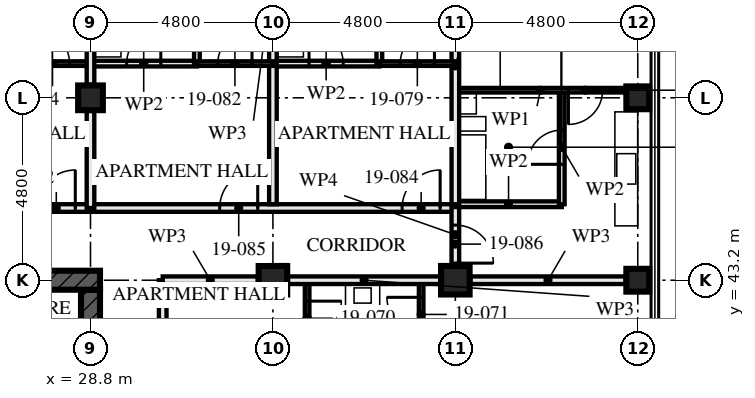
"""IFC4 building model, lengths in metres.
Left out: names, types, materials, properties, quantities, classifications, styles, units other than length and angle.
Written with IfcOpenShell. Run it as: python <this file> out.ifc"""

import sys

from ifc_helpers import new_model, si_unit, direction, frame, frame_2d, origin, origin_2d, place, context, subcontext, project, spatial, rectangle, hollow_rectangle, extrude, element, fill, save


model = new_model("IFC4")
c1 = context("Model", 3, precision=1e-05, world=origin(), true_north=direction((0.0, 1.0)))
c2 = subcontext(c1, "Body", "Model", "MODEL_VIEW")
j1 = project(units=[si_unit("LENGTHUNIT", "METRE"), si_unit("PLANEANGLEUNIT", "RADIAN")], contexts=[c1])
p1 = place(None, origin())
s1 = spatial("IfcSite", under=j1, at=p1, CompositionType="ELEMENT")
p2 = place(p1, origin())
s2 = spatial("IfcBuilding", under=s1, at=p2, CompositionType="ELEMENT")
p3 = place(p2, frame((0.0, 0.0, 72.5)))
s3 = spatial("IfcBuildingStorey", under=s2, at=p3, CompositionType="ELEMENT", Elevation=72.5)
p4 = place(p3, frame((28.8, 48.0, 0.0), z_axis=(0.0, 0.0, 1.0), x_axis=(1.0, 0.0, 0.0)))
e1 = element("IfcColumn", 1, at=p4, inside=s3, PredefinedType="COLUMN", context=c2, shape_type="SweptSolid", body=[
    extrude(hollow_rectangle(XDim=0.65, YDim=0.65, WallThickness=0.05, at=origin_2d()), origin(), (0.0, 0.0, 1.0), 3.5),
])
for number, where, z_axis, x_axis in (
    (2, (33.6, 43.2, 0.0), (0.0, 0.0, 1.0), (0.0, 1.0, 0.0)),
    (3, (38.4, 43.2, 0.0), (0.0, 0.0, 1.0), (0.0, 1.0, 0.0)),
):
    element("IfcColumn", number, at=place(p3, frame(where, z_axis=z_axis, x_axis=x_axis)), inside=s3, PredefinedType="COLUMN", context=c2, shape_type="SweptSolid", body=[
        extrude(hollow_rectangle(XDim=0.75, YDim=0.75, WallThickness=0.08, at=origin_2d()), origin(), (0.0, 0.0, 1.0), 3.5),
    ])
for number, where, z_axis, x_axis in (
    (4, (43.2, 43.2, 0.0), (0.0, 0.0, 1.0), (0.0, 1.0, 0.0)),
    (5, (43.2, 48.0, 0.0), (0.0, 0.0, 1.0), (1.0, 0.0, 0.0)),
):
    element("IfcColumn", number, at=place(p3, frame(where, z_axis=z_axis, x_axis=x_axis)), inside=s3, PredefinedType="COLUMN", context=c2, shape_type="SweptSolid", body=[
        extrude(hollow_rectangle(XDim=0.6, YDim=0.6, WallThickness=0.08, at=origin_2d()), origin(), (0.0, 0.0, 1.0), 3.5),
    ])
p5 = place(p3, frame((29.05, 43.2, -0.17), z_axis=(0.0, 0.0, 1.0), x_axis=(-1.0, 0.0, 0.0)))
e6 = element("IfcWall", 6, at=p5, inside=s3, PredefinedType="SHEAR", context=c2, shape_type="SweptSolid", body=[
    extrude(rectangle(XDim=14.9, YDim=0.5, at=frame_2d((7.45, 0.0))), origin(), (0.0, 0.0, 1.0), 3.5),
])
p6 = place(p5, frame((6.85, 0.0, 0.17)))
e7 = element("IfcOpeningElement", 7, at=p6, cuts=e6, PredefinedType="OPENING", context=c2, shape_type="SweptSolid", body=[
    extrude(rectangle(XDim=1.2, YDim=2.1, at=frame_2d((0.6, 1.05))), frame((0.0, 0.26, 0.0), z_axis=(0.0, -1.0, 0.0), x_axis=(1.0, 0.0, 0.0)), (0.0, 0.0, 1.0), 0.521),
])
p7 = place(p3, frame((28.8, 29.05, -0.17), z_axis=(0.0, 0.0, 1.0), x_axis=(0.0, 1.0, 0.0)))
e8 = element("IfcWall", 8, at=p7, inside=s3, PredefinedType="SHEAR", context=c2, shape_type="SweptSolid", body=[
    extrude(rectangle(XDim=13.9, YDim=0.5, at=frame_2d((6.95, 0.0))), origin(), (0.0, 0.0, 1.0), 3.5),
])
p8 = place(p7, frame((6.35, 0.0, 0.17)))
e9 = element("IfcOpeningElement", 9, at=p8, cuts=e8, PredefinedType="OPENING", context=c2, shape_type="SweptSolid", body=[
    extrude(rectangle(XDim=1.2, YDim=2.1, at=frame_2d((0.6, 1.05))), frame((0.0, 0.26, 0.0), z_axis=(0.0, -1.0, 0.0), x_axis=(1.0, 0.0, 0.0)), (0.0, 0.0, 1.0), 0.521),
])
p9 = place(p3, frame((28.8, 48.9, 0.0), z_axis=(0.0, 0.0, 1.0), x_axis=(-1.0, 0.0, 0.0)))
e10 = element("IfcWall", 10, at=p9, inside=s3, PredefinedType="PARTITIONING", context=c2, shape_type="SweptSolid", body=[
    extrude(rectangle(XDim=2.0, YDim=0.12, at=frame_2d((1.0, 0.0))), origin(), (0.0, 0.0, 1.0), 3.33),
])
p10 = place(p9, frame((0.55, 0.0, 0.0)))
e11 = element("IfcOpeningElement", 11, at=p10, cuts=e10, PredefinedType="OPENING", context=c2, shape_type="SweptSolid", body=[
    extrude(rectangle(XDim=0.9, YDim=2.1, at=frame_2d((0.45, 1.05))), frame((0.0, 0.071, 0.0), z_axis=(0.0, -1.0, 0.0), x_axis=(1.0, 0.0, 0.0)), (0.0, 0.0, 1.0), 0.141),
])
p11 = place(p3, frame((28.8, 45.1, 0.0), z_axis=(0.0, 0.0, 1.0), x_axis=(-1.0, 0.0, 0.0)))
e12 = element("IfcWall", 12, at=p11, inside=s3, PredefinedType="PARTITIONING", context=c2, shape_type="SweptSolid", body=[
    extrude(rectangle(XDim=14.4, YDim=0.2, at=frame_2d((7.2, 0.0))), origin(), (0.0, 0.0, 1.0), 3.33),
])
p12 = place(p11, frame((0.4, 0.0, 0.0)))
e13 = element("IfcOpeningElement", 13, at=p12, cuts=e12, PredefinedType="OPENING", context=c2, shape_type="SweptSolid", body=[
    extrude(rectangle(XDim=1.0, YDim=2.1, at=frame_2d((0.5, 1.05))), frame((0.0, 0.111, 0.0), z_axis=(0.0, -1.0, 0.0), x_axis=(1.0, 0.0, 0.0)), (0.0, 0.0, 1.0), 0.221),
])
p13 = place(p11, frame((5.2, 0.0, 0.0)))
e14 = element("IfcOpeningElement", 14, at=p13, cuts=e12, PredefinedType="OPENING", context=c2, shape_type="SweptSolid", body=[
    extrude(rectangle(XDim=1.0, YDim=2.1, at=frame_2d((0.5, 1.05))), frame((0.0, 0.111, 0.0), z_axis=(0.0, -1.0, 0.0), x_axis=(1.0, 0.0, 0.0)), (0.0, 0.0, 1.0), 0.221),
])
p14 = place(p11, frame((10.0, 0.0, 0.0)))
e15 = element("IfcOpeningElement", 15, at=p14, cuts=e12, PredefinedType="OPENING", context=c2, shape_type="SweptSolid", body=[
    extrude(rectangle(XDim=1.0, YDim=2.1, at=frame_2d((0.5, 1.05))), frame((0.0, 0.111, 0.0), z_axis=(0.0, -1.0, 0.0), x_axis=(1.0, 0.0, 0.0)), (0.0, 0.0, 1.0), 0.221),
])
p15 = place(p3, frame((34.5, 41.2, 0.0), z_axis=(0.0, 0.0, 1.0), x_axis=(0.0, 1.0, 0.0)))
e16 = element("IfcWall", 16, at=p15, inside=s3, PredefinedType="PARTITIONING", context=c2, shape_type="SweptSolid", body=[
    extrude(rectangle(XDim=2.0, YDim=0.12, at=frame_2d((1.0, 0.0))), origin(), (0.0, 0.0, 1.0), 3.33),
])
p16 = place(p15, frame((0.55, 0.0, 0.0)))
e17 = element("IfcOpeningElement", 17, at=p16, cuts=e16, PredefinedType="OPENING", context=c2, shape_type="SweptSolid", body=[
    extrude(rectangle(XDim=0.9, YDim=2.1, at=frame_2d((0.45, 1.05))), frame((0.0, 0.071, 0.0), z_axis=(0.0, -1.0, 0.0), x_axis=(1.0, 0.0, 0.0)), (0.0, 0.0, 1.0), 0.141),
])
p17 = place(p3, frame((37.5, 38.4, 0.0), z_axis=(0.0, 0.0, 1.0), x_axis=(0.0, 1.0, 0.0)))
e18 = element("IfcWall", 18, at=p17, inside=s3, PredefinedType="PARTITIONING", context=c2, shape_type="SweptSolid", body=[
    extrude(rectangle(XDim=4.8, YDim=0.12, at=frame_2d((2.4, 0.0))), origin(), (0.0, 0.0, 1.0), 3.33),
])
p18 = place(p17, frame((3.45, 0.0, 0.0)))
e19 = element("IfcOpeningElement", 19, at=p18, cuts=e18, PredefinedType="OPENING", context=c2, shape_type="SweptSolid", body=[
    extrude(rectangle(XDim=0.9, YDim=2.1, at=frame_2d((0.45, 1.05))), frame((0.0, 0.071, 0.0), z_axis=(0.0, -1.0, 0.0), x_axis=(1.0, 0.0, 0.0)), (0.0, 0.0, 1.0), 0.141),
])
p19 = place(p3, frame((30.7, 28.8, 0.0), z_axis=(0.0, 0.0, 1.0), x_axis=(0.0, 1.0, 0.0)))
e20 = element("IfcWall", 20, at=p19, inside=s3, PredefinedType="PARTITIONING", context=c2, shape_type="SweptSolid", body=[
    extrude(rectangle(XDim=14.4, YDim=0.2, at=frame_2d((7.2, 0.0))), origin(), (0.0, 0.0, 1.0), 2.55),
])
p20 = place(p19, frame((1.4, 0.0, 0.0)))
e21 = element("IfcOpeningElement", 21, at=p20, cuts=e20, PredefinedType="OPENING", context=c2, shape_type="SweptSolid", body=[
    extrude(rectangle(XDim=1.0, YDim=2.1, at=frame_2d((0.5, 1.05))), frame((0.0, 0.111, 0.0), z_axis=(0.0, -1.0, 0.0), x_axis=(1.0, 0.0, 0.0)), (0.0, 0.0, 1.0), 0.221),
])
p21 = place(p19, frame((4.1, 0.0, 0.0)))
e22 = element("IfcOpeningElement", 22, at=p21, cuts=e20, PredefinedType="OPENING", context=c2, shape_type="SweptSolid", body=[
    extrude(rectangle(XDim=1.0, YDim=2.1, at=frame_2d((0.5, 1.05))), frame((0.0, 0.111, 0.0), z_axis=(0.0, -1.0, 0.0), x_axis=(1.0, 0.0, 0.0)), (0.0, 0.0, 1.0), 0.221),
])
p22 = place(p19, frame((5.975, 0.0, 0.0)))
e23 = element("IfcOpeningElement", 23, at=p22, cuts=e20, PredefinedType="OPENING", context=c2, shape_type="SweptSolid", body=[
    extrude(rectangle(XDim=1.0, YDim=2.1, at=frame_2d((0.5, 1.05))), frame((0.0, 0.111, 0.0), z_axis=(0.0, -1.0, 0.0), x_axis=(1.0, 0.0, 0.0)), (0.0, 0.0, 1.0), 0.221),
])
p23 = place(p19, frame((10.0, 0.0, 0.0)))
e24 = element("IfcOpeningElement", 24, at=p23, cuts=e20, PredefinedType="OPENING", context=c2, shape_type="SweptSolid", body=[
    extrude(rectangle(XDim=1.0, YDim=2.1, at=frame_2d((0.5, 1.05))), frame((0.0, 0.111, 0.0), z_axis=(0.0, -1.0, 0.0), x_axis=(1.0, 0.0, 0.0)), (0.0, 0.0, 1.0), 0.221),
])
p24 = place(p3, frame((41.2, 48.2, 0.0), z_axis=(0.0, 0.0, 1.0), x_axis=(0.0, -1.0, 0.0)))
e25 = element("IfcWall", 25, at=p24, inside=s3, PredefinedType="PARTITIONING", context=c2, shape_type="SweptSolid", body=[
    extrude(rectangle(XDim=3.0, YDim=0.15, at=frame_2d((1.5, 0.0))), origin(), (0.0, 0.0, 1.0), 2.55),
])
p25 = place(p24, frame((1.05, 0.0, 0.0)))
e26 = element("IfcOpeningElement", 26, at=p25, cuts=e25, PredefinedType="OPENING", context=c2, shape_type="SweptSolid", body=[
    extrude(rectangle(XDim=0.9, YDim=2.1, at=frame_2d((0.45, 1.05))), frame((0.0, 0.085, 0.0), z_axis=(0.0, -1.0, 0.0), x_axis=(1.0, 0.0, 0.0)), (0.0, 0.0, 1.0), 0.171),
])
p26 = place(p3, frame((41.2, 45.2, 0.0), z_axis=(0.0, 0.0, 1.0), x_axis=(-1.0, 0.0, 0.0)))
e27 = element("IfcWall", 27, at=p26, inside=s3, PredefinedType="PARTITIONING", context=c2, shape_type="SweptSolid", body=[
    extrude(rectangle(XDim=2.8, YDim=0.15, at=frame_2d((1.4, 0.0))), origin(), (0.0, 0.0, 1.0), 3.33),
])
p27 = place(p3, frame((42.88, 48.2, 0.0), z_axis=(0.0, 0.0, 1.0), x_axis=(-1.0, 0.0, 0.0)))
e28 = element("IfcWall", 28, at=p27, inside=s3, PredefinedType="PARTITIONING", context=c2, shape_type="SweptSolid", body=[
    extrude(rectangle(XDim=4.48, YDim=0.12, at=frame_2d((2.24, 0.0))), origin(), (0.0, 0.0, 1.0), 3.33),
])
p28 = place(p27, frame((0.605, 0.0, 0.0)))
e29 = element("IfcOpeningElement", 29, at=p28, cuts=e28, PredefinedType="OPENING", context=c2, shape_type="SweptSolid", body=[
    extrude(rectangle(XDim=0.9, YDim=2.1, at=frame_2d((0.45, 1.05))), frame((0.0, 0.071, 0.0), z_axis=(0.0, -1.0, 0.0), x_axis=(1.0, 0.0, 0.0)), (0.0, 0.0, 1.0), 0.141),
])
p29 = place(p3, frame((38.4, 52.48, 0.0), z_axis=(0.0, 0.0, 1.0), x_axis=(0.0, -1.0, 0.0)))
e30 = element("IfcWall", 30, at=p29, inside=s3, PredefinedType="PARTITIONING", context=c2, shape_type="SweptSolid", body=[
    extrude(rectangle(XDim=7.28, YDim=0.2, at=frame_2d((3.64, 0.0))), origin(), (0.0, 0.0, 1.0), 2.55),
])
p30 = place(p3, frame((36.4, 51.9, 0.0), z_axis=(0.0, 0.0, 1.0), x_axis=(0.0, -1.0, 0.0)))
e31 = element("IfcWall", 31, at=p30, inside=s3, PredefinedType="PARTITIONING", context=c2, shape_type="SweptSolid", body=[
    extrude(rectangle(XDim=3.0, YDim=0.15, at=frame_2d((1.5, 0.0))), origin(), (0.0, 0.0, 1.0), 3.33),
])
p31 = place(p3, frame((36.4, 48.9, 0.0), z_axis=(0.0, 0.0, 1.0), x_axis=(-1.0, 0.0, 0.0)))
e32 = element("IfcWall", 32, at=p31, inside=s3, PredefinedType="PARTITIONING", context=c2, shape_type="SweptSolid", body=[
    extrude(rectangle(XDim=2.8, YDim=0.15, at=frame_2d((1.4, 0.0))), origin(), (0.0, 0.0, 1.0), 3.33),
])
p32 = place(p31, frame((0.95, 0.0, 0.0)))
e33 = element("IfcOpeningElement", 33, at=p32, cuts=e32, PredefinedType="OPENING", context=c2, shape_type="SweptSolid", body=[
    extrude(rectangle(XDim=0.9, YDim=2.1, at=frame_2d((0.45, 1.05))), frame((0.0, 0.085, 0.0), z_axis=(0.0, -1.0, 0.0), x_axis=(1.0, 0.0, 0.0)), (0.0, 0.0, 1.0), 0.171),
])
p33 = place(p3, frame((38.4, 48.9, 0.0), z_axis=(0.0, 0.0, 1.0), x_axis=(-1.0, 0.0, 0.0)))
e34 = element("IfcWall", 34, at=p33, inside=s3, PredefinedType="PARTITIONING", context=c2, shape_type="SweptSolid", body=[
    extrude(rectangle(XDim=2.0, YDim=0.12, at=frame_2d((1.0, 0.0))), origin(), (0.0, 0.0, 1.0), 3.33),
])
p34 = place(p33, frame((0.55, 0.0, 0.0)))
e35 = element("IfcOpeningElement", 35, at=p34, cuts=e34, PredefinedType="OPENING", context=c2, shape_type="SweptSolid", body=[
    extrude(rectangle(XDim=0.9, YDim=2.1, at=frame_2d((0.45, 1.05))), frame((0.0, 0.071, 0.0), z_axis=(0.0, -1.0, 0.0), x_axis=(1.0, 0.0, 0.0)), (0.0, 0.0, 1.0), 0.141),
])
p35 = place(p3, frame((33.6, 57.28, 0.0), z_axis=(0.0, 0.0, 1.0), x_axis=(0.0, -1.0, 0.0)))
e36 = element("IfcWall", 36, at=p35, inside=s3, PredefinedType="PARTITIONING", context=c2, shape_type="SweptSolid", body=[
    extrude(rectangle(XDim=12.08, YDim=0.2, at=frame_2d((6.04, 0.0))), origin(), (0.0, 0.0, 1.0), 2.55),
])
p36 = place(p3, frame((31.6, 51.9, 0.0), z_axis=(0.0, 0.0, 1.0), x_axis=(0.0, -1.0, 0.0)))
e37 = element("IfcWall", 37, at=p36, inside=s3, PredefinedType="PARTITIONING", context=c2, shape_type="SweptSolid", body=[
    extrude(rectangle(XDim=3.0, YDim=0.15, at=frame_2d((1.5, 0.0))), origin(), (0.0, 0.0, 1.0), 3.33),
])
p37 = place(p3, frame((31.6, 48.9, 0.0), z_axis=(0.0, 0.0, 1.0), x_axis=(-1.0, 0.0, 0.0)))
e38 = element("IfcWall", 38, at=p37, inside=s3, PredefinedType="PARTITIONING", context=c2, shape_type="SweptSolid", body=[
    extrude(rectangle(XDim=2.8, YDim=0.15, at=frame_2d((1.4, 0.0))), origin(), (0.0, 0.0, 1.0), 3.33),
])
p38 = place(p37, frame((0.95, 0.0, 0.0)))
e39 = element("IfcOpeningElement", 39, at=p38, cuts=e38, PredefinedType="OPENING", context=c2, shape_type="SweptSolid", body=[
    extrude(rectangle(XDim=0.9, YDim=2.1, at=frame_2d((0.45, 1.05))), frame((0.0, 0.085, 0.0), z_axis=(0.0, -1.0, 0.0), x_axis=(1.0, 0.0, 0.0)), (0.0, 0.0, 1.0), 0.171),
])
p39 = place(p3, frame((33.6, 48.9, 0.0), z_axis=(0.0, 0.0, 1.0), x_axis=(-1.0, 0.0, 0.0)))
e40 = element("IfcWall", 40, at=p39, inside=s3, PredefinedType="PARTITIONING", context=c2, shape_type="SweptSolid", body=[
    extrude(rectangle(XDim=2.0, YDim=0.12, at=frame_2d((1.0, 0.0))), origin(), (0.0, 0.0, 1.0), 3.33),
])
p40 = place(p39, frame((0.55, 0.0, 0.0)))
e41 = element("IfcOpeningElement", 41, at=p40, cuts=e40, PredefinedType="OPENING", context=c2, shape_type="SweptSolid", body=[
    extrude(rectangle(XDim=0.9, YDim=2.1, at=frame_2d((0.45, 1.05))), frame((0.0, 0.071, 0.0), z_axis=(0.0, -1.0, 0.0), x_axis=(1.0, 0.0, 0.0)), (0.0, 0.0, 1.0), 0.141),
])
p41 = place(p3, frame((38.4, 45.1, 0.0), z_axis=(0.0, 0.0, 1.0), x_axis=(-1.0, 0.0, 0.0)))
e42 = element("IfcWall", 42, at=p41, inside=s3, PredefinedType="PARTITIONING", context=c2, shape_type="SweptSolid", body=[
    extrude(rectangle(XDim=9.6, YDim=0.2, at=frame_2d((4.8, 0.0))), origin(), (0.0, 0.0, 1.0), 3.33),
])
p42 = place(p41, frame((0.4, 0.0, 0.0)))
e43 = element("IfcOpeningElement", 43, at=p42, cuts=e42, PredefinedType="OPENING", context=c2, shape_type="SweptSolid", body=[
    extrude(rectangle(XDim=1.0, YDim=2.1, at=frame_2d((0.5, 1.05))), frame((0.0, 0.111, 0.0), z_axis=(0.0, -1.0, 0.0), x_axis=(1.0, 0.0, 0.0)), (0.0, 0.0, 1.0), 0.221),
])
p43 = place(p41, frame((5.2, 0.0, 0.0)))
e44 = element("IfcOpeningElement", 44, at=p43, cuts=e42, PredefinedType="OPENING", context=c2, shape_type="SweptSolid", body=[
    extrude(rectangle(XDim=1.0, YDim=2.1, at=frame_2d((0.5, 1.05))), frame((0.0, 0.111, 0.0), z_axis=(0.0, -1.0, 0.0), x_axis=(1.0, 0.0, 0.0)), (0.0, 0.0, 1.0), 0.221),
])
p44 = place(p3, frame((38.4, 45.2, 0.0), z_axis=(0.0, 0.0, 1.0), x_axis=(0.0, -1.0, 0.0)))
e45 = element("IfcWall", 45, at=p44, inside=s3, PredefinedType="PARTITIONING", context=c2, shape_type="SweptSolid", body=[
    extrude(rectangle(XDim=1.605, YDim=0.2, at=frame_2d((0.802, 0.0))), origin(), (0.0, 0.0, 1.0), 3.33),
])
p45 = place(p44, frame((0.55, 0.0, 0.0)))
e46 = element("IfcOpeningElement", 46, at=p45, cuts=e45, PredefinedType="OPENING", context=c2, shape_type="SweptSolid", body=[
    extrude(rectangle(XDim=1.0, YDim=2.1, at=frame_2d((0.5, 1.05))), frame((0.0, 0.111, 0.0), z_axis=(0.0, -1.0, 0.0), x_axis=(1.0, 0.0, 0.0)), (0.0, 0.0, 1.0), 0.221),
])
p46 = place(p3, frame((28.8, 45.1, 0.0), z_axis=(0.0, 0.0, 1.0), x_axis=(0.0, 1.0, 0.0)))
e47 = element("IfcWall", 47, at=p46, inside=s3, PredefinedType="PARTITIONING", context=c2, shape_type="SweptSolid", body=[
    extrude(rectangle(XDim=2.555, YDim=0.2, at=frame_2d((1.277, 0.0))), origin(), (0.0, 0.0, 1.0), 2.32),
])
p47 = place(p3, frame((28.8, 48.345, 0.0), z_axis=(0.0, 0.0, 1.0), x_axis=(0.0, 1.0, 0.0)))
e48 = element("IfcWall", 48, at=p47, inside=s3, PredefinedType="PARTITIONING", context=c2, shape_type="SweptSolid", body=[
    extrude(rectangle(XDim=4.11, YDim=0.2, at=frame_2d((2.055, 0.0))), origin(), (0.0, 0.0, 1.0), 2.32),
])
p48 = place(p3, frame((42.88, 43.2, 0.0), z_axis=(0.0, 0.0, 1.0), x_axis=(-1.0, 0.0, 0.0)))
e49 = element("IfcWall", 49, at=p48, inside=s3, PredefinedType="PARTITIONING", context=c2, shape_type="SweptSolid", body=[
    extrude(rectangle(XDim=4.085, YDim=0.2, at=frame_2d((2.042, 0.0))), origin(), (0.0, 0.0, 1.0), 2.32),
])
p49 = place(p3, frame((38.005, 43.2, 0.0), z_axis=(0.0, 0.0, 1.0), x_axis=(-1.0, 0.0, 0.0)))
e50 = element("IfcWall", 50, at=p49, inside=s3, PredefinedType="PARTITIONING", context=c2, shape_type="SweptSolid", body=[
    extrude(rectangle(XDim=4.01, YDim=0.2, at=frame_2d((2.005, 0.0))), origin(), (0.0, 0.0, 1.0), 2.32),
])
p50 = place(p3, frame((33.205, 43.2, 0.0), z_axis=(0.0, 0.0, 1.0), x_axis=(-1.0, 0.0, 0.0)))
e51 = element("IfcWall", 51, at=p50, inside=s3, PredefinedType="PARTITIONING", context=c2, shape_type="SweptSolid", body=[
    extrude(rectangle(XDim=2.505, YDim=0.2, at=frame_2d((1.252, 0.0))), origin(), (0.0, 0.0, 1.0), 2.32),
])
p51 = place(p10, frame((0.9, 0.0, 0.0), z_axis=(0.0, 0.0, 1.0), x_axis=(-1.0, 0.0, 0.0)))
e52 = element("IfcDoor", 52, at=p51, inside=s3, OperationType="SINGLE_SWING_RIGHT", PredefinedType="DOOR", context=c2, shape_type="SweptSolid", body=[
    extrude(rectangle(XDim=0.9, YDim=2.1, at=frame_2d((0.45, 1.05))), frame((0.0, 0.022, 0.0), z_axis=(0.0, -1.0, 0.0), x_axis=(1.0, 0.0, 0.0)), (0.0, 0.0, 1.0), 0.044),
])
fill(e11, e52)
p52 = place(p12, frame((1.0, 0.0, 0.0), z_axis=(0.0, 0.0, 1.0), x_axis=(-1.0, 0.0, 0.0)))
e53 = element("IfcDoor", 53, at=p52, inside=s3, OperationType="SINGLE_SWING_LEFT", PredefinedType="DOOR", context=c2, shape_type="SweptSolid", body=[
    extrude(rectangle(XDim=1.0, YDim=2.1, at=frame_2d((0.5, 1.05))), frame((0.0, 0.027, 0.0), z_axis=(0.0, -1.0, 0.0), x_axis=(1.0, 0.0, 0.0)), (0.0, 0.0, 1.0), 0.054),
])
fill(e13, e53)
p53 = place(p16, frame((0.9, 0.0, 0.0), z_axis=(0.0, 0.0, 1.0), x_axis=(-1.0, 0.0, 0.0)))
e54 = element("IfcDoor", 54, at=p53, inside=s3, OperationType="SINGLE_SWING_RIGHT", PredefinedType="DOOR", context=c2, shape_type="SweptSolid", body=[
    extrude(rectangle(XDim=0.9, YDim=2.1, at=frame_2d((0.45, 1.05))), frame((0.0, 0.022, 0.0), z_axis=(0.0, -1.0, 0.0), x_axis=(1.0, 0.0, 0.0)), (0.0, 0.0, 1.0), 0.044),
])
fill(e17, e54)
p54 = place(p18, origin())
e55 = element("IfcDoor", 55, at=p54, inside=s3, OperationType="SINGLE_SWING_LEFT", PredefinedType="DOOR", context=c2, shape_type="SweptSolid", body=[
    extrude(rectangle(XDim=0.9, YDim=2.1, at=frame_2d((0.45, 1.05))), frame((0.0, 0.022, 0.0), z_axis=(0.0, -1.0, 0.0), x_axis=(1.0, 0.0, 0.0)), (0.0, 0.0, 1.0), 0.044),
])
fill(e19, e55)
p55 = place(p25, frame((0.9, 0.0, 0.0), z_axis=(0.0, 0.0, 1.0), x_axis=(-1.0, 0.0, 0.0)))
e56 = element("IfcDoor", 56, at=p55, inside=s3, OperationType="SINGLE_SWING_RIGHT", PredefinedType="DOOR", context=c2, shape_type="SweptSolid", body=[
    extrude(rectangle(XDim=0.9, YDim=2.1, at=frame_2d((0.45, 1.05))), frame((0.0, 0.022, 0.0), z_axis=(0.0, -1.0, 0.0), x_axis=(1.0, 0.0, 0.0)), (0.0, 0.0, 1.0), 0.044),
])
fill(e26, e56)
p56 = place(p28, origin())
e57 = element("IfcDoor", 57, at=p56, inside=s3, OperationType="SINGLE_SWING_LEFT", PredefinedType="DOOR", context=c2, shape_type="SweptSolid", body=[
    extrude(rectangle(XDim=0.9, YDim=2.1, at=frame_2d((0.45, 1.05))), frame((0.0, 0.022, 0.0), z_axis=(0.0, -1.0, 0.0), x_axis=(1.0, 0.0, 0.0)), (0.0, 0.0, 1.0), 0.044),
])
fill(e29, e57)
p57 = place(p32, frame((0.9, 0.0, 0.0), z_axis=(0.0, 0.0, 1.0), x_axis=(-1.0, 0.0, 0.0)))
e58 = element("IfcDoor", 58, at=p57, inside=s3, OperationType="SINGLE_SWING_RIGHT", PredefinedType="DOOR", context=c2, shape_type="SweptSolid", body=[
    extrude(rectangle(XDim=0.9, YDim=2.1, at=frame_2d((0.45, 1.05))), frame((0.0, 0.022, 0.0), z_axis=(0.0, -1.0, 0.0), x_axis=(1.0, 0.0, 0.0)), (0.0, 0.0, 1.0), 0.044),
])
fill(e33, e58)
p58 = place(p34, frame((0.9, 0.0, 0.0), z_axis=(0.0, 0.0, 1.0), x_axis=(-1.0, 0.0, 0.0)))
e59 = element("IfcDoor", 59, at=p58, inside=s3, OperationType="SINGLE_SWING_LEFT", PredefinedType="DOOR", context=c2, shape_type="SweptSolid", body=[
    extrude(rectangle(XDim=0.9, YDim=2.1, at=frame_2d((0.45, 1.05))), frame((0.0, 0.022, 0.0), z_axis=(0.0, -1.0, 0.0), x_axis=(1.0, 0.0, 0.0)), (0.0, 0.0, 1.0), 0.044),
])
fill(e35, e59)
p59 = place(p38, frame((0.9, 0.0, 0.0), z_axis=(0.0, 0.0, 1.0), x_axis=(-1.0, 0.0, 0.0)))
e60 = element("IfcDoor", 60, at=p59, inside=s3, OperationType="SINGLE_SWING_LEFT", PredefinedType="DOOR", context=c2, shape_type="SweptSolid", body=[
    extrude(rectangle(XDim=0.9, YDim=2.1, at=frame_2d((0.45, 1.05))), frame((0.0, 0.022, 0.0), z_axis=(0.0, -1.0, 0.0), x_axis=(1.0, 0.0, 0.0)), (0.0, 0.0, 1.0), 0.044),
])
fill(e39, e60)
p60 = place(p40, frame((0.9, 0.0, 0.0), z_axis=(0.0, 0.0, 1.0), x_axis=(-1.0, 0.0, 0.0)))
e61 = element("IfcDoor", 61, at=p60, inside=s3, OperationType="SINGLE_SWING_LEFT", PredefinedType="DOOR", context=c2, shape_type="SweptSolid", body=[
    extrude(rectangle(XDim=0.9, YDim=2.1, at=frame_2d((0.45, 1.05))), frame((0.0, 0.022, 0.0), z_axis=(0.0, -1.0, 0.0), x_axis=(1.0, 0.0, 0.0)), (0.0, 0.0, 1.0), 0.044),
])
fill(e41, e61)
p61 = place(p42, frame((1.0, 0.0, 0.0), z_axis=(0.0, 0.0, 1.0), x_axis=(-1.0, 0.0, 0.0)))
e62 = element("IfcDoor", 62, at=p61, inside=s3, OperationType="SINGLE_SWING_LEFT", PredefinedType="DOOR", context=c2, shape_type="SweptSolid", body=[
    extrude(rectangle(XDim=1.0, YDim=2.1, at=frame_2d((0.5, 1.05))), frame((0.0, 0.027, 0.0), z_axis=(0.0, -1.0, 0.0), x_axis=(1.0, 0.0, 0.0)), (0.0, 0.0, 1.0), 0.054),
])
fill(e43, e62)
p62 = place(p43, frame((1.0, 0.0, 0.0), z_axis=(0.0, 0.0, 1.0), x_axis=(-1.0, 0.0, 0.0)))
e63 = element("IfcDoor", 63, at=p62, inside=s3, OperationType="SINGLE_SWING_LEFT", PredefinedType="DOOR", context=c2, shape_type="SweptSolid", body=[
    extrude(rectangle(XDim=1.0, YDim=2.1, at=frame_2d((0.5, 1.05))), frame((0.0, 0.027, 0.0), z_axis=(0.0, -1.0, 0.0), x_axis=(1.0, 0.0, 0.0)), (0.0, 0.0, 1.0), 0.054),
])
fill(e44, e63)
p63 = place(p45, origin())
e64 = element("IfcDoor", 64, at=p63, inside=s3, OperationType="SINGLE_SWING_LEFT", PredefinedType="DOOR", context=c2, shape_type="SweptSolid", body=[
    extrude(rectangle(XDim=1.0, YDim=2.1, at=frame_2d((0.5, 1.05))), frame((0.0, 0.027, 0.0), z_axis=(0.0, -1.0, 0.0), x_axis=(1.0, 0.0, 0.0)), (0.0, 0.0, 1.0), 0.054),
])
fill(e46, e64)
save(model, sys.argv[1])
